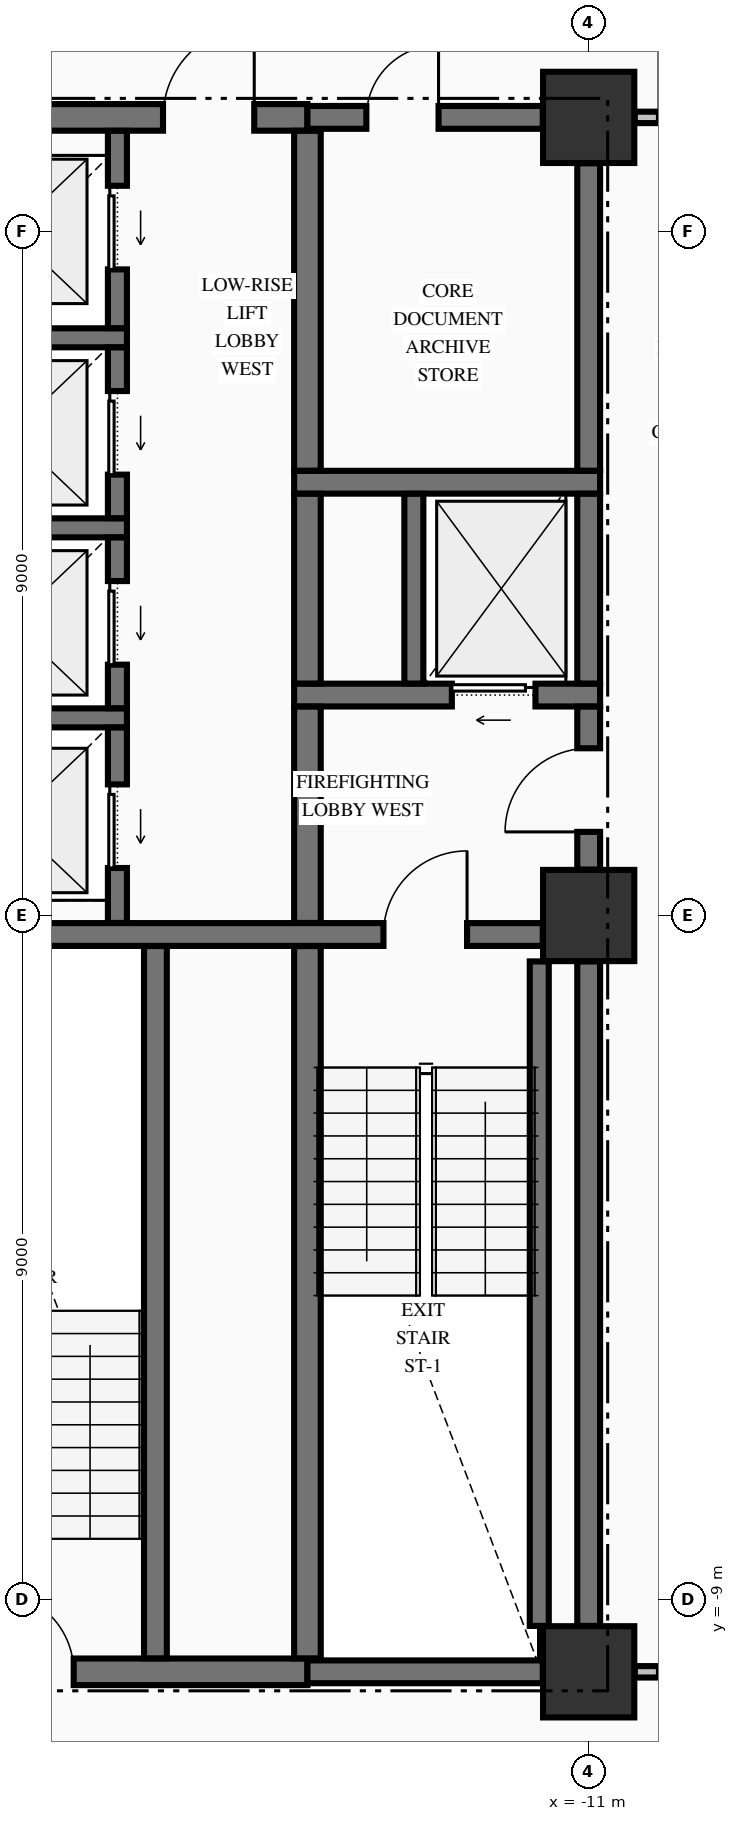
"""IFC4 building model, lengths in metres.
Left out: names, types, materials, properties, quantities, classifications, styles, units other than length and angle.
Written with IfcOpenShell. Run it as: python <this file> out.ifc"""

import sys

from ifc_helpers import new_model, si_unit, direction, frame, frame_2d, origin, origin_2d, place, context, subcontext, project, spatial, rectangle, extrude, element, fill, save


model = new_model("IFC4")
c1 = context("Model", 3, precision=1e-05, world=origin(), true_north=direction((0.0, 1.0)))
c2 = subcontext(c1, "Body", "Model", "MODEL_VIEW")
j1 = project(units=[si_unit("LENGTHUNIT", "METRE"), si_unit("PLANEANGLEUNIT", "RADIAN")], contexts=[c1])
p1 = place(None, origin())
s1 = spatial("IfcSite", under=j1, at=p1, CompositionType="ELEMENT")
p2 = place(p1, origin())
s2 = spatial("IfcBuilding", under=s1, at=p2, CompositionType="ELEMENT")
p3 = place(p2, frame((0.0, 0.0, 67.9)))
s3 = spatial("IfcBuildingStorey", under=s2, at=p3, CompositionType="ELEMENT", Elevation=67.9)
for number, where, z_axis, x_axis in (
    (1, (-11.0, -9.95, -0.25), (0.0, 0.0, 1.0), (1.0, 0.0, 0.0)),
    (2, (-11.0, 0.0, -0.25), (0.0, 0.0, 1.0), (1.0, 0.0, 0.0)),
    (3, (-11.0, 10.5, -0.25), (0.0, 0.0, 1.0), (1.0, 0.0, 0.0)),
):
    element("IfcColumn", number, at=place(p3, frame(where, z_axis=z_axis, x_axis=x_axis)), inside=s3, PredefinedType="COLUMN", context=c2, shape_type="SweptSolid", body=[
        extrude(rectangle(XDim=1.2, YDim=1.2, at=origin_2d()), origin(), (0.0, 0.0, 1.0), 3.495),
    ])
p4 = place(p3, frame((-19.396, -9.95, 0.0), z_axis=(0.0, 0.0, 1.0), x_axis=(1.0, 0.0, 0.0)))
e4 = element("IfcWall", 4, at=p4, inside=s3, PredefinedType="SHEAR", context=c2, shape_type="SweptSolid", body=[
    extrude(rectangle(XDim=4.696, YDim=0.35, at=frame_2d((2.348, 0.0))), origin(), (0.0, 0.0, 1.0), 3.245),
])
p5 = place(p4, frame((0.571, 0.0, 0.0)))
e5 = element("IfcOpeningElement", 5, at=p5, cuts=e4, PredefinedType="OPENING", context=c2, shape_type="SweptSolid", body=[
    extrude(rectangle(XDim=1.05, YDim=2.15, at=frame_2d((0.525, 1.075))), frame((0.0, 0.185, 0.0), z_axis=(0.0, -1.0, 0.0), x_axis=(1.0, 0.0, 0.0)), (0.0, 0.0, 1.0), 0.37),
])
p6 = place(p3, frame((-14.7, -9.95, 0.0), z_axis=(0.0, 0.0, 1.0), x_axis=(1.0, 0.0, 0.0)))
e6 = element("IfcWall", 6, at=p6, inside=s3, PredefinedType="SHEAR", context=c2, shape_type="SweptSolid", body=[
    extrude(rectangle(XDim=3.096, YDim=0.3, at=frame_2d((1.548, 0.0))), origin(), (0.0, 0.0, 1.0), 3.245),
])
p7 = place(p3, frame((-19.396, -0.25, 0.0), z_axis=(0.0, 0.0, 1.0), x_axis=(1.0, 0.0, 0.0)))
e7 = element("IfcWall", 7, at=p7, inside=s3, PredefinedType="SHEAR", context=c2, shape_type="SweptSolid", body=[
    extrude(rectangle(XDim=7.792, YDim=0.3, at=frame_2d((3.896, 0.0))), origin(), (0.0, 0.0, 1.0), 3.245),
])
p8 = place(p7, frame((5.696, 0.0, 0.0)))
e8 = element("IfcOpeningElement", 8, at=p8, cuts=e7, PredefinedType="OPENING", context=c2, shape_type="SweptSolid", body=[
    extrude(rectangle(XDim=1.1, YDim=2.15, at=frame_2d((0.55, 1.075))), frame((0.0, 0.16, 0.0), z_axis=(0.0, -1.0, 0.0), x_axis=(1.0, 0.0, 0.0)), (0.0, 0.0, 1.0), 0.32),
])
p9 = place(p3, frame((-20.175, 2.6, 0.0), z_axis=(0.0, 0.0, 1.0), x_axis=(1.0, 0.0, 0.0)))
e9 = element("IfcWall", 9, at=p9, inside=s3, PredefinedType="SOLIDWALL", context=c2, shape_type="SweptSolid", body=[
    extrude(rectangle(XDim=3.1, YDim=0.25, at=frame_2d((1.55, 0.0))), origin(), (0.0, 0.0, 1.0), 3.245),
])
p10 = place(p3, frame((-14.875, 2.9, 0.0), z_axis=(0.0, 0.0, 1.0), x_axis=(1.0, 0.0, 0.0)))
e10 = element("IfcWall", 10, at=p10, inside=s3, PredefinedType="SHEAR", context=c2, shape_type="SweptSolid", body=[
    extrude(rectangle(XDim=4.025, YDim=0.3, at=frame_2d((2.012, 0.0))), origin(), (0.0, 0.0, 1.0), 3.245),
])
p11 = place(p10, frame((2.075, 0.0, 0.0)))
e11 = element("IfcOpeningElement", 11, at=p11, cuts=e10, PredefinedType="OPENING", context=c2, shape_type="SweptSolid", body=[
    extrude(rectangle(XDim=1.1, YDim=2.2, at=frame_2d((0.55, 1.1))), frame((0.0, 0.16, 0.0), z_axis=(0.0, -1.0, 0.0), x_axis=(1.0, 0.0, 0.0)), (0.0, 0.0, 1.0), 0.32),
])
p12 = place(p3, frame((-20.175, 5.1, 0.0), z_axis=(0.0, 0.0, 1.0), x_axis=(1.0, 0.0, 0.0)))
e12 = element("IfcWall", 12, at=p12, inside=s3, PredefinedType="SOLIDWALL", context=c2, shape_type="SweptSolid", body=[
    extrude(rectangle(XDim=3.1, YDim=0.25, at=frame_2d((1.55, 0.0))), origin(), (0.0, 0.0, 1.0), 3.245),
])
p13 = place(p3, frame((-14.875, 5.7, 0.0), z_axis=(0.0, 0.0, 1.0), x_axis=(1.0, 0.0, 0.0)))
e13 = element("IfcWall", 13, at=p13, inside=s3, PredefinedType="SHEAR", context=c2, shape_type="SweptSolid", body=[
    extrude(rectangle(XDim=4.025, YDim=0.3, at=frame_2d((2.012, 0.0))), origin(), (0.0, 0.0, 1.0), 3.245),
])
p14 = place(p3, frame((-20.175, 7.6, 0.0), z_axis=(0.0, 0.0, 1.0), x_axis=(1.0, 0.0, 0.0)))
e14 = element("IfcWall", 14, at=p14, inside=s3, PredefinedType="SOLIDWALL", context=c2, shape_type="SweptSolid", body=[
    extrude(rectangle(XDim=3.1, YDim=0.25, at=frame_2d((1.55, 0.0))), origin(), (0.0, 0.0, 1.0), 3.245),
])
p15 = place(p3, frame((-19.396, 10.5, 0.0), z_axis=(0.0, 0.0, 1.0), x_axis=(1.0, 0.0, 0.0)))
e15 = element("IfcWall", 15, at=p15, inside=s3, PredefinedType="SHEAR", context=c2, shape_type="SweptSolid", body=[
    extrude(rectangle(XDim=4.696, YDim=0.35, at=frame_2d((2.348, 0.0))), origin(), (0.0, 0.0, 1.0), 3.245),
])
p16 = place(p15, frame((2.796, 0.0, 0.0)))
e16 = element("IfcOpeningElement", 16, at=p16, cuts=e15, PredefinedType="OPENING", context=c2, shape_type="SweptSolid", body=[
    extrude(rectangle(XDim=1.2, YDim=2.15, at=frame_2d((0.6, 1.075))), frame((0.0, 0.185, 0.0), z_axis=(0.0, -1.0, 0.0), x_axis=(1.0, 0.0, 0.0)), (0.0, 0.0, 1.0), 0.37),
])
p17 = place(p3, frame((-14.7, 10.5, 0.0), z_axis=(0.0, 0.0, 1.0), x_axis=(1.0, 0.0, 0.0)))
e17 = element("IfcWall", 17, at=p17, inside=s3, PredefinedType="SHEAR", context=c2, shape_type="SweptSolid", body=[
    extrude(rectangle(XDim=3.096, YDim=0.3, at=frame_2d((1.548, 0.0))), origin(), (0.0, 0.0, 1.0), 3.245),
])
p18 = place(p17, frame((0.775, 0.0, 0.0)))
e18 = element("IfcOpeningElement", 18, at=p18, cuts=e17, PredefinedType="OPENING", context=c2, shape_type="SweptSolid", body=[
    extrude(rectangle(XDim=0.95, YDim=2.15, at=frame_2d((0.475, 1.075))), frame((0.0, 0.16, 0.0), z_axis=(0.0, -1.0, 0.0), x_axis=(1.0, 0.0, 0.0)), (0.0, 0.0, 1.0), 0.32),
])
p19 = place(p3, frame((-10.394, -9.95, 0.0), z_axis=(0.0, 0.0, 1.0), x_axis=(1.0, 0.0, 0.0)))
e19 = element("IfcWall", 19, at=p19, inside=s3, PredefinedType="PARTITIONING", context=c2, shape_type="SweptSolid", body=[
    extrude(rectangle(XDim=20.788, YDim=0.15, at=frame_2d((10.394, 0.0))), origin(), (0.0, 0.0, 1.0), 3.245),
])
p20 = place(p19, frame((0.319, 0.0, 0.0)))
e20 = element("IfcOpeningElement", 20, at=p20, cuts=e19, PredefinedType="OPENING", context=c2, shape_type="SweptSolid", body=[
    extrude(rectangle(XDim=1.05, YDim=2.15, at=frame_2d((0.525, 1.075))), frame((0.0, 0.085, 0.0), z_axis=(0.0, -1.0, 0.0), x_axis=(1.0, 0.0, 0.0)), (0.0, 0.0, 1.0), 0.17),
])
p21 = place(p19, frame((19.419, 0.0, 0.0)))
e21 = element("IfcOpeningElement", 21, at=p21, cuts=e19, PredefinedType="OPENING", context=c2, shape_type="SweptSolid", body=[
    extrude(rectangle(XDim=1.05, YDim=2.15, at=frame_2d((0.525, 1.075))), frame((0.0, 0.085, 0.0), z_axis=(0.0, -1.0, 0.0), x_axis=(1.0, 0.0, 0.0)), (0.0, 0.0, 1.0), 0.17),
])
p22 = place(p19, frame((13.369, 0.0, 0.0)))
e22 = element("IfcOpeningElement", 22, at=p22, cuts=e19, PredefinedType="OPENING", context=c2, shape_type="SweptSolid", body=[
    extrude(rectangle(XDim=0.95, YDim=2.15, at=frame_2d((0.475, 1.075))), frame((0.0, 0.085, 0.0), z_axis=(0.0, -1.0, 0.0), x_axis=(1.0, 0.0, 0.0)), (0.0, 0.0, 1.0), 0.17),
])
p23 = place(p3, frame((-10.394, 10.5, 0.0), z_axis=(0.0, 0.0, 1.0), x_axis=(1.0, 0.0, 0.0)))
e23 = element("IfcWall", 23, at=p23, inside=s3, PredefinedType="PARTITIONING", context=c2, shape_type="SweptSolid", body=[
    extrude(rectangle(XDim=20.788, YDim=0.15, at=frame_2d((10.394, 0.0))), origin(), (0.0, 0.0, 1.0), 3.245),
])
p24 = place(p23, frame((0.319, 0.0, 0.0)))
e24 = element("IfcOpeningElement", 24, at=p24, cuts=e23, PredefinedType="OPENING", context=c2, shape_type="SweptSolid", body=[
    extrude(rectangle(XDim=1.05, YDim=2.15, at=frame_2d((0.525, 1.075))), frame((0.0, 0.085, 0.0), z_axis=(0.0, -1.0, 0.0), x_axis=(1.0, 0.0, 0.0)), (0.0, 0.0, 1.0), 0.17),
])
p25 = place(p23, frame((19.419, 0.0, 0.0)))
e25 = element("IfcOpeningElement", 25, at=p25, cuts=e23, PredefinedType="OPENING", context=c2, shape_type="SweptSolid", body=[
    extrude(rectangle(XDim=1.05, YDim=2.15, at=frame_2d((0.525, 1.075))), frame((0.0, 0.085, 0.0), z_axis=(0.0, -1.0, 0.0), x_axis=(1.0, 0.0, 0.0)), (0.0, 0.0, 1.0), 0.17),
])
p26 = place(p3, frame((-17.2, -0.098, 0.0), z_axis=(0.0, 0.0, 1.0), x_axis=(0.0, 1.0, 0.0)))
e26 = element("IfcWall", 26, at=p26, inside=s3, PredefinedType="SOLIDWALL", context=c2, shape_type="SweptSolid", body=[
    extrude(rectangle(XDim=2.571, YDim=0.25, at=frame_2d((1.285, 0.0))), origin(), (0.0, 0.0, 1.0), 3.245),
])
p27 = place(p26, frame((0.723, 0.0, 0.0)))
e27 = element("IfcOpeningElement", 27, at=p27, cuts=e26, PredefinedType="OPENING", context=c2, shape_type="SweptSolid", body=[
    extrude(rectangle(XDim=1.1, YDim=2.2, at=frame_2d((0.55, 1.1))), frame((0.0, 0.135, 0.0), z_axis=(0.0, -1.0, 0.0), x_axis=(1.0, 0.0, 0.0)), (0.0, 0.0, 1.0), 0.27),
])
p28 = place(p3, frame((-17.2, 2.727, 0.0), z_axis=(0.0, 0.0, 1.0), x_axis=(0.0, 1.0, 0.0)))
e28 = element("IfcWall", 28, at=p28, inside=s3, PredefinedType="SOLIDWALL", context=c2, shape_type="SweptSolid", body=[
    extrude(rectangle(XDim=2.246, YDim=0.25, at=frame_2d((1.123, 0.0))), origin(), (0.0, 0.0, 1.0), 3.245),
])
p29 = place(p28, frame((0.573, 0.0, 0.0)))
e29 = element("IfcOpeningElement", 29, at=p29, cuts=e28, PredefinedType="OPENING", context=c2, shape_type="SweptSolid", body=[
    extrude(rectangle(XDim=1.1, YDim=2.2, at=frame_2d((0.55, 1.1))), frame((0.0, 0.135, 0.0), z_axis=(0.0, -1.0, 0.0), x_axis=(1.0, 0.0, 0.0)), (0.0, 0.0, 1.0), 0.27),
])
p30 = place(p3, frame((-17.2, 5.227, 0.0), z_axis=(0.0, 0.0, 1.0), x_axis=(0.0, 1.0, 0.0)))
e30 = element("IfcWall", 30, at=p30, inside=s3, PredefinedType="SOLIDWALL", context=c2, shape_type="SweptSolid", body=[
    extrude(rectangle(XDim=2.246, YDim=0.25, at=frame_2d((1.123, 0.0))), origin(), (0.0, 0.0, 1.0), 3.245),
])
p31 = place(p30, frame((0.573, 0.0, 0.0)))
e31 = element("IfcOpeningElement", 31, at=p31, cuts=e30, PredefinedType="OPENING", context=c2, shape_type="SweptSolid", body=[
    extrude(rectangle(XDim=1.1, YDim=2.2, at=frame_2d((0.55, 1.1))), frame((0.0, 0.135, 0.0), z_axis=(0.0, -1.0, 0.0), x_axis=(1.0, 0.0, 0.0)), (0.0, 0.0, 1.0), 0.27),
])
p32 = place(p3, frame((-17.2, 7.727, 0.0), z_axis=(0.0, 0.0, 1.0), x_axis=(0.0, 1.0, 0.0)))
e32 = element("IfcWall", 32, at=p32, inside=s3, PredefinedType="SOLIDWALL", context=c2, shape_type="SweptSolid", body=[
    extrude(rectangle(XDim=2.596, YDim=0.25, at=frame_2d((1.298, 0.0))), origin(), (0.0, 0.0, 1.0), 3.245),
])
p33 = place(p32, frame((0.773, 0.0, 0.0)))
e33 = element("IfcOpeningElement", 33, at=p33, cuts=e32, PredefinedType="OPENING", context=c2, shape_type="SweptSolid", body=[
    extrude(rectangle(XDim=1.1, YDim=2.2, at=frame_2d((0.55, 1.1))), frame((0.0, 0.135, 0.0), z_axis=(0.0, -1.0, 0.0), x_axis=(1.0, 0.0, 0.0)), (0.0, 0.0, 1.0), 0.27),
])
p34 = place(p3, frame((-16.7, -9.773, 0.0), z_axis=(0.0, 0.0, 1.0), x_axis=(0.0, 1.0, 0.0)))
e34 = element("IfcWall", 34, at=p34, inside=s3, PredefinedType="SHEAR", context=c2, shape_type="SweptSolid", body=[
    extrude(rectangle(XDim=9.371, YDim=0.3, at=frame_2d((4.686, 0.0))), origin(), (0.0, 0.0, 1.0), 3.245),
])
p35 = place(p3, frame((-14.7, -9.773, 0.0), z_axis=(0.0, 0.0, 1.0), x_axis=(0.0, 1.0, 0.0)))
e35 = element("IfcWall", 35, at=p35, inside=s3, PredefinedType="SHEAR", context=c2, shape_type="SweptSolid", body=[
    extrude(rectangle(XDim=9.371, YDim=0.35, at=frame_2d((4.686, 0.0))), origin(), (0.0, 0.0, 1.0), 3.245),
])
p36 = place(p3, frame((-14.7, -0.098, 0.0), z_axis=(0.0, 0.0, 1.0), x_axis=(0.0, 1.0, 0.0)))
e36 = element("IfcWall", 36, at=p36, inside=s3, PredefinedType="SHEAR", context=c2, shape_type="SweptSolid", body=[
    extrude(rectangle(XDim=2.846, YDim=0.35, at=frame_2d((1.423, 0.0))), origin(), (0.0, 0.0, 1.0), 3.245),
])
p37 = place(p3, frame((-14.7, 3.052, 0.0), z_axis=(0.0, 0.0, 1.0), x_axis=(0.0, 1.0, 0.0)))
e37 = element("IfcWall", 37, at=p37, inside=s3, PredefinedType="SHEAR", context=c2, shape_type="SweptSolid", body=[
    extrude(rectangle(XDim=2.496, YDim=0.35, at=frame_2d((1.248, 0.0))), origin(), (0.0, 0.0, 1.0), 3.245),
])
p38 = place(p3, frame((-14.7, 5.852, 0.0), z_axis=(0.0, 0.0, 1.0), x_axis=(0.0, 1.0, 0.0)))
e38 = element("IfcWall", 38, at=p38, inside=s3, PredefinedType="SHEAR", context=c2, shape_type="SweptSolid", body=[
    extrude(rectangle(XDim=4.471, YDim=0.35, at=frame_2d((2.235, 0.0))), origin(), (0.0, 0.0, 1.0), 3.245),
])
p39 = place(p3, frame((-13.3, 3.052, 0.0), z_axis=(0.0, 0.0, 1.0), x_axis=(0.0, 1.0, 0.0)))
e39 = element("IfcWall", 39, at=p39, inside=s3, PredefinedType="SOLIDWALL", context=c2, shape_type="SweptSolid", body=[
    extrude(rectangle(XDim=2.496, YDim=0.25, at=frame_2d((1.248, 0.0))), origin(), (0.0, 0.0, 1.0), 3.245),
])
p40 = place(p3, frame((-11.65, -9.346, 0.0), z_axis=(0.0, 0.0, 1.0), x_axis=(0.0, 1.0, 0.0)))
e40 = element("IfcWall", 40, at=p40, inside=s3, PredefinedType="SOLIDWALL", context=c2, shape_type="SweptSolid", body=[
    extrude(rectangle(XDim=8.742, YDim=0.25, at=frame_2d((4.371, 0.0))), origin(), (0.0, 0.0, 1.0), 3.245),
])
p41 = place(p3, frame((-11.0, -9.346, 0.0), z_axis=(0.0, 0.0, 1.0), x_axis=(0.0, 1.0, 0.0)))
e41 = element("IfcWall", 41, at=p41, inside=s3, PredefinedType="SHEAR", context=c2, shape_type="SweptSolid", body=[
    extrude(rectangle(XDim=8.742, YDim=0.3, at=frame_2d((4.371, 0.0))), origin(), (0.0, 0.0, 1.0), 3.245),
])
p42 = place(p3, frame((-11.0, 0.604, 0.0), z_axis=(0.0, 0.0, 1.0), x_axis=(0.0, 1.0, 0.0)))
e42 = element("IfcWall", 42, at=p42, inside=s3, PredefinedType="SHEAR", context=c2, shape_type="SweptSolid", body=[
    extrude(rectangle(XDim=2.144, YDim=0.3, at=frame_2d((1.072, 0.0))), origin(), (0.0, 0.0, 1.0), 3.245),
])
p43 = place(p42, frame((0.496, 0.0, 0.0)))
e43 = element("IfcOpeningElement", 43, at=p43, cuts=e42, PredefinedType="OPENING", context=c2, shape_type="SweptSolid", body=[
    extrude(rectangle(XDim=1.1, YDim=2.15, at=frame_2d((0.55, 1.075))), frame((0.0, 0.16, 0.0), z_axis=(0.0, -1.0, 0.0), x_axis=(1.0, 0.0, 0.0)), (0.0, 0.0, 1.0), 0.32),
])
p44 = place(p3, frame((-11.0, 3.052, 0.0), z_axis=(0.0, 0.0, 1.0), x_axis=(0.0, 1.0, 0.0)))
e44 = element("IfcWall", 44, at=p44, inside=s3, PredefinedType="SHEAR", context=c2, shape_type="SweptSolid", body=[
    extrude(rectangle(XDim=2.496, YDim=0.3, at=frame_2d((1.248, 0.0))), origin(), (0.0, 0.0, 1.0), 3.245),
])
p45 = place(p3, frame((-11.0, 5.852, 0.0), z_axis=(0.0, 0.0, 1.0), x_axis=(0.0, 1.0, 0.0)))
e45 = element("IfcWall", 45, at=p45, inside=s3, PredefinedType="SHEAR", context=c2, shape_type="SweptSolid", body=[
    extrude(rectangle(XDim=4.044, YDim=0.3, at=frame_2d((2.022, 0.0))), origin(), (0.0, 0.0, 1.0), 3.245),
])
p46 = place(p8, origin())
e46 = element("IfcDoor", 46, at=p46, inside=s3, OperationType="SINGLE_SWING_RIGHT", PredefinedType="DOOR", context=c2, shape_type="SweptSolid", body=[
    extrude(rectangle(XDim=1.1, YDim=2.15, at=frame_2d((0.55, 1.075))), frame((0.0, 0.025, 0.0), z_axis=(0.0, -1.0, 0.0), x_axis=(1.0, 0.0, 0.0)), (0.0, 0.0, 1.0), 0.05),
])
fill(e8, e46)
p47 = place(p43, origin())
e47 = element("IfcDoor", 47, at=p47, inside=s3, OperationType="SINGLE_SWING_LEFT", PredefinedType="DOOR", context=c2, shape_type="SweptSolid", body=[
    extrude(rectangle(XDim=1.1, YDim=2.15, at=frame_2d((0.55, 1.075))), frame((0.0, 0.025, 0.0), z_axis=(0.0, -1.0, 0.0), x_axis=(1.0, 0.0, 0.0)), (0.0, 0.0, 1.0), 0.05),
])
fill(e43, e47)
p48 = place(p11, origin())
e48 = element("IfcDoor", 48, at=p48, inside=s3, OperationType="SLIDING_TO_LEFT", PredefinedType="DOOR", context=c2, shape_type="SweptSolid", body=[
    extrude(rectangle(XDim=1.1, YDim=2.2, at=frame_2d((0.55, 1.1))), frame((0.0, 0.025, 0.0), z_axis=(0.0, -1.0, 0.0), x_axis=(1.0, 0.0, 0.0)), (0.0, 0.0, 1.0), 0.05),
])
fill(e11, e48)
p49 = place(p18, origin())
e49 = element("IfcDoor", 49, at=p49, inside=s3, OperationType="SINGLE_SWING_RIGHT", PredefinedType="DOOR", context=c2, shape_type="SweptSolid", body=[
    extrude(rectangle(XDim=0.95, YDim=2.15, at=frame_2d((0.475, 1.075))), frame((0.0, 0.025, 0.0), z_axis=(0.0, -1.0, 0.0), x_axis=(1.0, 0.0, 0.0)), (0.0, 0.0, 1.0), 0.05),
])
fill(e18, e49)
p50 = place(p5, origin())
e50 = element("IfcDoor", 50, at=p50, inside=s3, OperationType="SINGLE_SWING_LEFT", PredefinedType="DOOR", context=c2, shape_type="SweptSolid", body=[
    extrude(rectangle(XDim=1.05, YDim=2.15, at=frame_2d((0.525, 1.075))), frame((0.0, 0.025, 0.0), z_axis=(0.0, -1.0, 0.0), x_axis=(1.0, 0.0, 0.0)), (0.0, 0.0, 1.0), 0.05),
])
fill(e5, e50)
p51 = place(p16, origin())
e51 = element("IfcDoor", 51, at=p51, inside=s3, OperationType="SINGLE_SWING_RIGHT", PredefinedType="DOOR", context=c2, shape_type="SweptSolid", body=[
    extrude(rectangle(XDim=1.2, YDim=2.15, at=frame_2d((0.6, 1.075))), frame((0.0, 0.025, 0.0), z_axis=(0.0, -1.0, 0.0), x_axis=(1.0, 0.0, 0.0)), (0.0, 0.0, 1.0), 0.05),
])
fill(e16, e51)
p52 = place(p27, origin())
e52 = element("IfcDoor", 52, at=p52, inside=s3, OperationType="SLIDING_TO_LEFT", PredefinedType="DOOR", context=c2, shape_type="SweptSolid", body=[
    extrude(rectangle(XDim=1.1, YDim=2.2, at=frame_2d((0.55, 1.1))), frame((0.0, 0.025, 0.0), z_axis=(0.0, -1.0, 0.0), x_axis=(1.0, 0.0, 0.0)), (0.0, 0.0, 1.0), 0.05),
])
fill(e27, e52)
p53 = place(p29, origin())
e53 = element("IfcDoor", 53, at=p53, inside=s3, OperationType="SLIDING_TO_LEFT", PredefinedType="DOOR", context=c2, shape_type="SweptSolid", body=[
    extrude(rectangle(XDim=1.1, YDim=2.2, at=frame_2d((0.55, 1.1))), frame((0.0, 0.025, 0.0), z_axis=(0.0, -1.0, 0.0), x_axis=(1.0, 0.0, 0.0)), (0.0, 0.0, 1.0), 0.05),
])
fill(e29, e53)
p54 = place(p31, origin())
e54 = element("IfcDoor", 54, at=p54, inside=s3, OperationType="SLIDING_TO_LEFT", PredefinedType="DOOR", context=c2, shape_type="SweptSolid", body=[
    extrude(rectangle(XDim=1.1, YDim=2.2, at=frame_2d((0.55, 1.1))), frame((0.0, 0.025, 0.0), z_axis=(0.0, -1.0, 0.0), x_axis=(1.0, 0.0, 0.0)), (0.0, 0.0, 1.0), 0.05),
])
fill(e31, e54)
p55 = place(p33, origin())
e55 = element("IfcDoor", 55, at=p55, inside=s3, OperationType="SLIDING_TO_LEFT", PredefinedType="DOOR", context=c2, shape_type="SweptSolid", body=[
    extrude(rectangle(XDim=1.1, YDim=2.2, at=frame_2d((0.55, 1.1))), frame((0.0, 0.025, 0.0), z_axis=(0.0, -1.0, 0.0), x_axis=(1.0, 0.0, 0.0)), (0.0, 0.0, 1.0), 0.05),
])
fill(e33, e55)
save(model, sys.argv[1])
